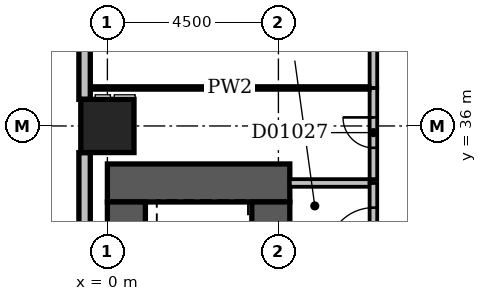
"""IFC4 building model, lengths in metres.
Left out: names, types, materials, properties, quantities, classifications, styles, units other than length and angle.
Written with IfcOpenShell. Run it as: python <this file> out.ifc"""

import sys

from ifc_helpers import new_model, si_unit, direction, frame, frame_2d, origin, origin_2d, place, context, subcontext, project, spatial, rectangle, extrude, element, fill, save


model = new_model("IFC4")
c1 = context("Model", 3, precision=1e-05, world=origin(), true_north=direction((0.0, 1.0)))
c2 = subcontext(c1, "Body", "Model", "MODEL_VIEW")
j1 = project(units=[si_unit("LENGTHUNIT", "METRE"), si_unit("PLANEANGLEUNIT", "RADIAN")], contexts=[c1])
p1 = place(None, origin())
s1 = spatial("IfcSite", under=j1, at=p1, CompositionType="ELEMENT")
p2 = place(p1, origin())
s2 = spatial("IfcBuilding", under=s1, at=p2, CompositionType="ELEMENT")
p3 = place(p2, frame((0.0, 0.0, 9.0)))
s3 = spatial("IfcBuildingStorey", under=s2, at=p3, CompositionType="ELEMENT", Elevation=9.0)
p4 = place(p3, frame((0.0, 34.5, -0.6), z_axis=(0.0, 0.0, 1.0), x_axis=(1.0, 0.0, 0.0)))
e1 = element("IfcWall", 1, at=p4, inside=s3, PredefinedType="SHEAR", context=c2, shape_type="SweptSolid", body=[
    extrude(rectangle(XDim=4.8, YDim=1.0, at=frame_2d((2.4, 0.0))), origin(), (0.0, 0.0, 1.0), 5.2),
])
p5 = place(p3, frame((0.5, 27.15, -0.6), z_axis=(0.0, 0.0, 1.0), x_axis=(0.0, 1.0, 0.0)))
e2 = element("IfcWall", 2, at=p5, inside=s3, PredefinedType="SHEAR", context=c2, shape_type="SweptSolid", body=[
    extrude(rectangle(XDim=6.85, YDim=1.0, at=frame_2d((3.425, 0.0))), origin(), (0.0, 0.0, 1.0), 5.2),
])
p6 = place(p3, frame((4.3, 27.15, -0.6), z_axis=(0.0, 0.0, 1.0), x_axis=(0.0, 1.0, 0.0)))
e3 = element("IfcWall", 3, at=p6, inside=s3, PredefinedType="SHEAR", context=c2, shape_type="SweptSolid", body=[
    extrude(rectangle(XDim=6.85, YDim=1.0, at=frame_2d((3.425, 0.0))), origin(), (0.0, 0.0, 1.0), 5.2),
])
p7 = place(p6, frame((3.05, 0.0, 0.6)))
e4 = element("IfcOpeningElement", 4, at=p7, cuts=e3, PredefinedType="OPENING", context=c2, shape_type="SweptSolid", body=[
    extrude(rectangle(XDim=1.1, YDim=2.1, at=frame_2d((0.55, 1.05))), frame((0.0, 0.512, 0.0), z_axis=(0.0, -1.0, 0.0), x_axis=(1.0, 0.0, 0.0)), (0.0, 0.0, 1.0), 1.024),
])
p8 = place(p6, frame((0.6, 0.0, 0.6)))
e5 = element("IfcOpeningElement", 5, at=p8, cuts=e3, PredefinedType="OPENING", context=c2, shape_type="SweptSolid", body=[
    extrude(rectangle(XDim=1.1, YDim=2.1, at=frame_2d((0.55, 1.05))), frame((0.0, 0.512, 0.0), z_axis=(0.0, -1.0, 0.0), x_axis=(1.0, 0.0, 0.0)), (0.0, 0.0, 1.0), 1.024),
])
p9 = place(p6, frame((5.15, 0.0, 0.6)))
e6 = element("IfcOpeningElement", 6, at=p9, cuts=e3, PredefinedType="OPENING", context=c2, shape_type="SweptSolid", body=[
    extrude(rectangle(XDim=1.1, YDim=2.1, at=frame_2d((0.55, 1.05))), frame((0.0, 0.512, 0.0), z_axis=(0.0, -1.0, 0.0), x_axis=(1.0, 0.0, 0.0)), (0.0, 0.0, 1.0), 1.024),
])
p10 = place(p3, frame((0.0, 36.0, -0.6), z_axis=(0.0, 0.0, 1.0), x_axis=(1.0, 0.0, 0.0)))
e7 = element("IfcColumn", 7, at=p10, inside=s3, PredefinedType="COLUMN", context=c2, shape_type="SweptSolid", body=[
    extrude(rectangle(XDim=1.4, YDim=1.4, at=origin_2d()), origin(), (0.0, 0.0, 1.0), 5.2),
])
for number, where, z_axis, x_axis in (
    (8, (-0.6, 39.8, 0.0), (0.0, 0.0, 1.0), (0.0, -1.0, 0.0)),
    (9, (-0.6, 35.3, 0.0), (0.0, 0.0, 1.0), (0.0, -1.0, 0.0)),
):
    element("IfcWall", number, at=place(p3, frame(where, z_axis=z_axis, x_axis=x_axis)), inside=s3, PredefinedType="STANDARD", context=c2, shape_type="SweptSolid", body=[
        extrude(rectangle(XDim=3.1, YDim=0.3, at=frame_2d((1.55, 0.0))), origin(), (0.0, 0.0, 1.0), 3.9),
    ])
p11 = place(p3, frame((7.0, 32.1, 0.0), z_axis=(0.0, 0.0, 1.0), x_axis=(0.0, 1.0, 0.0)))
e10 = element("IfcWall", 10, at=p11, inside=s3, PredefinedType="PARTITIONING", context=c2, shape_type="SweptSolid", body=[
    extrude(rectangle(XDim=2.4, YDim=0.2, at=frame_2d((1.2, 0.0))), origin(), (0.0, 0.0, 1.0), 4.6),
])
p12 = place(p11, frame((0.55, 0.0, 0.0)))
e11 = element("IfcOpeningElement", 11, at=p12, cuts=e10, PredefinedType="OPENING", context=c2, shape_type="SweptSolid", body=[
    extrude(rectangle(XDim=1.2, YDim=2.1, at=frame_2d((0.6, 1.05))), frame((0.0, 0.112, 0.0), z_axis=(0.0, -1.0, 0.0), x_axis=(1.0, 0.0, 0.0)), (0.0, 0.0, 1.0), 0.224),
])
p13 = place(p3, frame((4.8, 34.5, 0.0), z_axis=(0.0, 0.0, 1.0), x_axis=(1.0, 0.0, 0.0)))
e12 = element("IfcWall", 12, at=p13, inside=s3, PredefinedType="PARTITIONING", context=c2, shape_type="SweptSolid", body=[
    extrude(rectangle(XDim=2.1, YDim=0.2, at=frame_2d((1.05, 0.0))), origin(), (0.0, 0.0, 1.0), 4.6),
])
p14 = place(p3, frame((-0.45, 37.0, 0.0), z_axis=(0.0, 0.0, 1.0), x_axis=(1.0, 0.0, 0.0)))
e13 = element("IfcWall", 13, at=p14, inside=s3, PredefinedType="PARTITIONING", context=c2, shape_type="SweptSolid", body=[
    extrude(rectangle(XDim=7.35, YDim=0.1, at=frame_2d((3.675, 0.0))), origin(), (0.0, 0.0, 1.0), 4.6),
])
p15 = place(p3, frame((7.0, 37.0, 0.0), z_axis=(0.0, 0.0, 1.0), x_axis=(0.0, -1.0, 0.0)))
e14 = element("IfcWall", 14, at=p15, inside=s3, PredefinedType="PARTITIONING", context=c2, shape_type="SweptSolid", body=[
    extrude(rectangle(XDim=2.4, YDim=0.2, at=frame_2d((1.2, 0.0))), origin(), (0.0, 0.0, 1.0), 4.6),
])
p16 = place(p15, frame((0.775, 0.0, 0.0)))
e15 = element("IfcOpeningElement", 15, at=p16, cuts=e14, PredefinedType="OPENING", context=c2, shape_type="SweptSolid", body=[
    extrude(rectangle(XDim=0.8, YDim=2.1, at=frame_2d((0.4, 1.05))), frame((0.0, 0.112, 0.0), z_axis=(0.0, -1.0, 0.0), x_axis=(1.0, 0.0, 0.0)), (0.0, 0.0, 1.0), 0.224),
])
p17 = place(p3, frame((7.0, 49.4, 0.0), z_axis=(0.0, 0.0, 1.0), x_axis=(0.0, -1.0, 0.0)))
e16 = element("IfcWall", 16, at=p17, inside=s3, PredefinedType="PARTITIONING", context=c2, shape_type="SweptSolid", body=[
    extrude(rectangle(XDim=12.4, YDim=0.2, at=frame_2d((6.2, 0.0))), origin(), (0.0, 0.0, 1.0), 4.6),
])
p18 = place(p17, frame((5.325, 0.0, 0.0)))
e17 = element("IfcOpeningElement", 17, at=p18, cuts=e16, PredefinedType="OPENING", context=c2, shape_type="SweptSolid", body=[
    extrude(rectangle(XDim=1.8, YDim=2.4, at=frame_2d((0.9, 1.2))), frame((0.0, 0.112, 0.0), z_axis=(0.0, -1.0, 0.0), x_axis=(1.0, 0.0, 0.0)), (0.0, 0.0, 1.0), 0.224),
])
p19 = place(p12, origin())
e18 = element("IfcDoor", 18, at=p19, inside=s3, OperationType="SINGLE_SWING_LEFT", PredefinedType="DOOR", context=c2, shape_type="SweptSolid", body=[
    extrude(rectangle(XDim=1.2, YDim=2.1, at=frame_2d((0.6, 1.05))), frame((0.0, 0.025, 0.0), z_axis=(0.0, -1.0, 0.0), x_axis=(1.0, 0.0, 0.0)), (0.0, 0.0, 1.0), 0.05),
])
fill(e11, e18)
p20 = place(p16, frame((0.8, 0.0, 0.0), z_axis=(0.0, 0.0, 1.0), x_axis=(-1.0, 0.0, 0.0)))
e19 = element("IfcDoor", 19, at=p20, inside=s3, OperationType="SINGLE_SWING_RIGHT", PredefinedType="DOOR", context=c2, shape_type="SweptSolid", body=[
    extrude(rectangle(XDim=0.8, YDim=2.1, at=frame_2d((0.4, 1.05))), frame((0.0, 0.025, 0.0), z_axis=(0.0, -1.0, 0.0), x_axis=(1.0, 0.0, 0.0)), (0.0, 0.0, 1.0), 0.05),
])
fill(e15, e19)
save(model, sys.argv[1])
